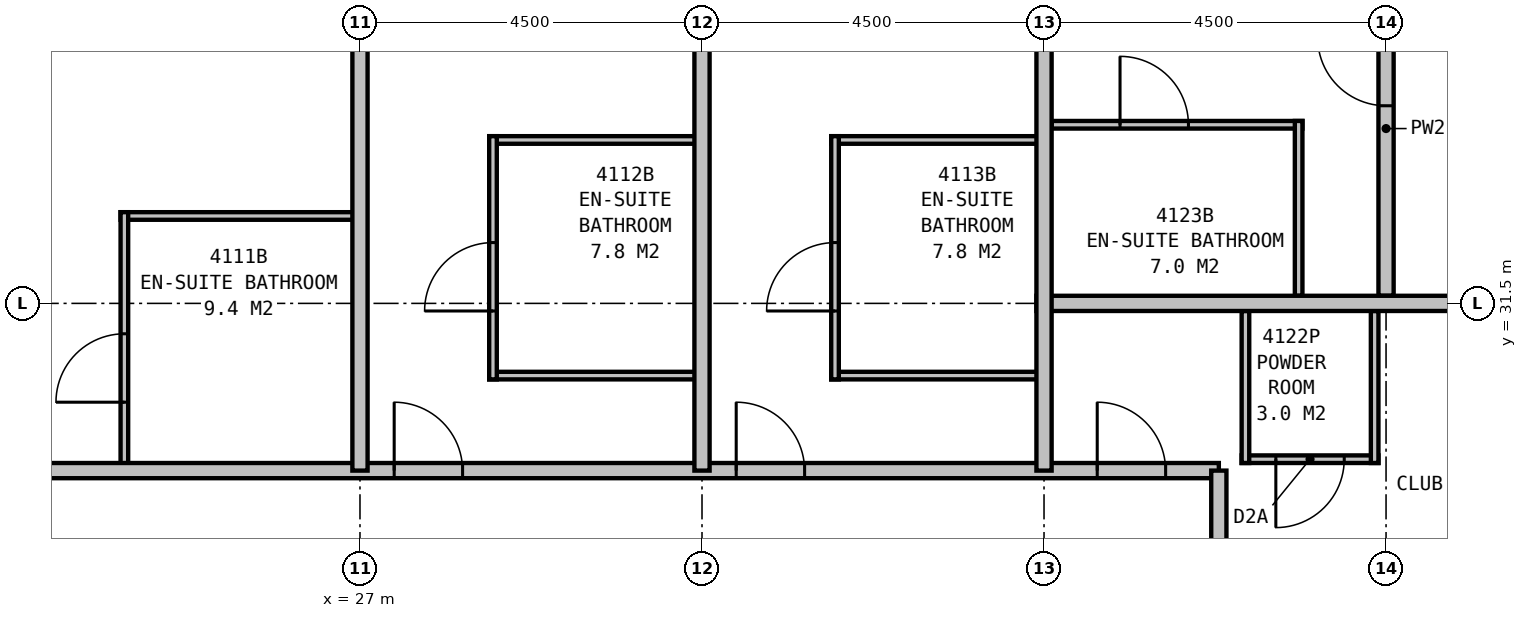
"""IFC4 building model, lengths in metres.
Left out: names, types, materials, properties, quantities, classifications, styles, units other than length and angle.
Written with IfcOpenShell. Run it as: python <this file> out.ifc"""

import sys

from ifc_helpers import new_model, si_unit, direction, frame, frame_2d, origin, place, context, subcontext, project, spatial, rectangle, extrude, element, fill, save


model = new_model("IFC4")
c1 = context("Model", 3, precision=1e-05, world=origin(), true_north=direction((0.0, 1.0)))
c2 = subcontext(c1, "Body", "Model", "MODEL_VIEW")
j1 = project(units=[si_unit("LENGTHUNIT", "METRE"), si_unit("PLANEANGLEUNIT", "RADIAN")], contexts=[c1])
p1 = place(None, origin())
s1 = spatial("IfcSite", under=j1, at=p1, CompositionType="ELEMENT")
p2 = place(p1, origin())
s2 = spatial("IfcBuilding", under=s1, at=p2, CompositionType="ELEMENT")
p3 = place(p2, frame((0.0, 0.0, 162.4)))
s3 = spatial("IfcBuildingStorey", under=s2, at=p3, CompositionType="ELEMENT", Elevation=162.4)
p4 = place(p3, frame((11.2, 29.3, 0.0), z_axis=(0.0, 0.0, 1.0), x_axis=(1.0, 0.0, 0.0)))
e1 = element("IfcWall", 1, at=p4, inside=s3, PredefinedType="PARTITIONING", context=c2, shape_type="SweptSolid", body=[
    extrude(rectangle(XDim=27.1, YDim=0.2, at=frame_2d((13.55, 0.0))), origin(), (0.0, 0.0, 1.0), 3.25),
])
p5 = place(p4, frame((2.75, 0.0, 0.0)))
e2 = element("IfcOpeningElement", 2, at=p5, cuts=e1, PredefinedType="OPENING", context=c2, shape_type="SweptSolid", body=[
    extrude(rectangle(XDim=0.9, YDim=2.1, at=frame_2d((0.45, 1.05))), frame((0.0, 0.11, 0.0), z_axis=(0.0, -1.0, 0.0), x_axis=(1.0, 0.0, 0.0)), (0.0, 0.0, 1.0), 0.22),
])
p6 = place(p4, frame((9.55, 0.0, 0.0)))
e3 = element("IfcOpeningElement", 3, at=p6, cuts=e1, PredefinedType="OPENING", context=c2, shape_type="SweptSolid", body=[
    extrude(rectangle(XDim=0.9, YDim=2.1, at=frame_2d((0.45, 1.05))), frame((0.0, 0.11, 0.0), z_axis=(0.0, -1.0, 0.0), x_axis=(1.0, 0.0, 0.0)), (0.0, 0.0, 1.0), 0.22),
])
p7 = place(p4, frame((16.25, 0.0, 0.0)))
e4 = element("IfcOpeningElement", 4, at=p7, cuts=e1, PredefinedType="OPENING", context=c2, shape_type="SweptSolid", body=[
    extrude(rectangle(XDim=0.9, YDim=2.1, at=frame_2d((0.45, 1.05))), frame((0.0, 0.11, 0.0), z_axis=(0.0, -1.0, 0.0), x_axis=(1.0, 0.0, 0.0)), (0.0, 0.0, 1.0), 0.22),
])
p8 = place(p4, frame((20.75, 0.0, 0.0)))
e5 = element("IfcOpeningElement", 5, at=p8, cuts=e1, PredefinedType="OPENING", context=c2, shape_type="SweptSolid", body=[
    extrude(rectangle(XDim=0.9, YDim=2.1, at=frame_2d((0.45, 1.05))), frame((0.0, 0.11, 0.0), z_axis=(0.0, -1.0, 0.0), x_axis=(1.0, 0.0, 0.0)), (0.0, 0.0, 1.0), 0.22),
])
p9 = place(p4, frame((25.5, 0.0, 0.0)))
e6 = element("IfcOpeningElement", 6, at=p9, cuts=e1, PredefinedType="OPENING", context=c2, shape_type="SweptSolid", body=[
    extrude(rectangle(XDim=0.9, YDim=2.1, at=frame_2d((0.45, 1.05))), frame((0.0, 0.11, 0.0), z_axis=(0.0, -1.0, 0.0), x_axis=(1.0, 0.0, 0.0)), (0.0, 0.0, 1.0), 0.22),
])
p10 = place(p4, frame((0.7, 0.0, 0.0)))
e7 = element("IfcOpeningElement", 7, at=p10, cuts=e1, PredefinedType="OPENING", context=c2, shape_type="SweptSolid", body=[
    extrude(rectangle(XDim=0.9, YDim=2.1, at=frame_2d((0.45, 1.05))), frame((0.0, 0.11, 0.0), z_axis=(0.0, -1.0, 0.0), x_axis=(1.0, 0.0, 0.0)), (0.0, 0.0, 1.0), 0.22),
])
p11 = place(p3, frame((38.3, 10.6, 0.0), z_axis=(0.0, 0.0, 1.0), x_axis=(0.0, 1.0, 0.0)))
e8 = element("IfcWall", 8, at=p11, inside=s3, PredefinedType="PARTITIONING", context=c2, shape_type="SweptSolid", body=[
    extrude(rectangle(XDim=18.7, YDim=0.2, at=frame_2d((9.35, 0.0))), origin(), (0.0, 0.0, 1.0), 3.25),
])
p12 = place(p11, frame((6.95, 0.0, 0.0), z_axis=(0.0, 0.0, 1.0), x_axis=(-1.0, 0.0, 0.0)))
e9 = element("IfcOpeningElement", 9, at=p12, cuts=e8, PredefinedType="OPENING", context=c2, shape_type="SweptSolid", body=[
    extrude(rectangle(XDim=0.9, YDim=2.1, at=frame_2d((0.45, 1.05))), frame((0.0, 0.11, 0.0), z_axis=(0.0, -1.0, 0.0), x_axis=(1.0, 0.0, 0.0)), (0.0, 0.0, 1.0), 0.22),
])
p13 = place(p11, frame((11.05, 0.0, 0.0), z_axis=(0.0, 0.0, 1.0), x_axis=(-1.0, 0.0, 0.0)))
e10 = element("IfcOpeningElement", 10, at=p13, cuts=e8, PredefinedType="OPENING", context=c2, shape_type="SweptSolid", body=[
    extrude(rectangle(XDim=0.9, YDim=2.1, at=frame_2d((0.45, 1.05))), frame((0.0, 0.11, 0.0), z_axis=(0.0, -1.0, 0.0), x_axis=(1.0, 0.0, 0.0)), (0.0, 0.0, 1.0), 0.22),
])
for number, where, z_axis, x_axis in (
    (11, (27.0, 29.3, 0.0), (0.0, 0.0, 1.0), (0.0, 1.0, 0.0)),
    (12, (31.5, 29.3, 0.0), (0.0, 0.0, 1.0), (0.0, 1.0, 0.0)),
):
    element("IfcWall", number, at=place(p3, frame(where, z_axis=z_axis, x_axis=x_axis)), inside=s3, PredefinedType="PARTITIONING", context=c2, shape_type="SweptSolid", body=[
        extrude(rectangle(XDim=11.2, YDim=0.2, at=frame_2d((5.6, 0.0))), origin(), (0.0, 0.0, 1.0), 2.25),
    ])
p14 = place(p3, frame((23.85, 32.65, 0.0), z_axis=(0.0, 0.0, 1.0), x_axis=(1.0, 0.0, 0.0)))
e13 = element("IfcWall", 13, at=p14, inside=s3, PredefinedType="PLUMBINGWALL", context=c2, shape_type="SweptSolid", body=[
    extrude(rectangle(XDim=3.15, YDim=0.1, at=frame_2d((1.575, 0.0))), origin(), (0.0, 0.0, 1.0), 3.25),
])
p15 = place(p3, frame((23.9, 29.3, 0.0), z_axis=(0.0, 0.0, 1.0), x_axis=(0.0, 1.0, 0.0)))
e14 = element("IfcWall", 14, at=p15, inside=s3, PredefinedType="PLUMBINGWALL", context=c2, shape_type="SweptSolid", body=[
    extrude(rectangle(XDim=3.4, YDim=0.1, at=frame_2d((1.7, 0.0))), origin(), (0.0, 0.0, 1.0), 3.25),
])
p16 = place(p15, frame((0.9, 0.0, 0.0)))
e15 = element("IfcOpeningElement", 15, at=p16, cuts=e14, PredefinedType="OPENING", context=c2, shape_type="SweptSolid", body=[
    extrude(rectangle(XDim=0.9, YDim=2.1, at=frame_2d((0.45, 1.05))), frame((0.0, 0.06, 0.0), z_axis=(0.0, -1.0, 0.0), x_axis=(1.0, 0.0, 0.0)), (0.0, 0.0, 1.0), 0.12),
])
for number, where, z_axis, x_axis in (
    (16, (28.7, 30.55, 0.0), (0.0, 0.0, 1.0), (1.0, 0.0, 0.0)),
    (17, (28.7, 33.65, 0.0), (0.0, 0.0, 1.0), (1.0, 0.0, 0.0)),
):
    element("IfcWall", number, at=place(p3, frame(where, z_axis=z_axis, x_axis=x_axis)), inside=s3, PredefinedType="PLUMBINGWALL", context=c2, shape_type="SweptSolid", body=[
        extrude(rectangle(XDim=2.8, YDim=0.1, at=frame_2d((1.4, 0.0))), origin(), (0.0, 0.0, 1.0), 3.25),
    ])
p17 = place(p3, frame((28.75, 30.5, 0.0), z_axis=(0.0, 0.0, 1.0), x_axis=(0.0, 1.0, 0.0)))
e18 = element("IfcWall", 18, at=p17, inside=s3, PredefinedType="PLUMBINGWALL", context=c2, shape_type="SweptSolid", body=[
    extrude(rectangle(XDim=3.2, YDim=0.1, at=frame_2d((1.6, 0.0))), origin(), (0.0, 0.0, 1.0), 3.25),
])
p18 = place(p17, frame((0.9, 0.0, 0.0)))
e19 = element("IfcOpeningElement", 19, at=p18, cuts=e18, PredefinedType="OPENING", context=c2, shape_type="SweptSolid", body=[
    extrude(rectangle(XDim=0.9, YDim=2.1, at=frame_2d((0.45, 1.05))), frame((0.0, 0.06, 0.0), z_axis=(0.0, -1.0, 0.0), x_axis=(1.0, 0.0, 0.0)), (0.0, 0.0, 1.0), 0.12),
])
for number, where, z_axis, x_axis in (
    (20, (33.2, 30.55, 0.0), (0.0, 0.0, 1.0), (1.0, 0.0, 0.0)),
    (21, (33.2, 33.65, 0.0), (0.0, 0.0, 1.0), (1.0, 0.0, 0.0)),
):
    element("IfcWall", number, at=place(p3, frame(where, z_axis=z_axis, x_axis=x_axis)), inside=s3, PredefinedType="PLUMBINGWALL", context=c2, shape_type="SweptSolid", body=[
        extrude(rectangle(XDim=2.8, YDim=0.1, at=frame_2d((1.4, 0.0))), origin(), (0.0, 0.0, 1.0), 3.25),
    ])
p19 = place(p3, frame((33.25, 30.5, 0.0), z_axis=(0.0, 0.0, 1.0), x_axis=(0.0, 1.0, 0.0)))
e22 = element("IfcWall", 22, at=p19, inside=s3, PredefinedType="PLUMBINGWALL", context=c2, shape_type="SweptSolid", body=[
    extrude(rectangle(XDim=3.2, YDim=0.1, at=frame_2d((1.6, 0.0))), origin(), (0.0, 0.0, 1.0), 3.25),
])
p20 = place(p19, frame((0.9, 0.0, 0.0)))
e23 = element("IfcOpeningElement", 23, at=p20, cuts=e22, PredefinedType="OPENING", context=c2, shape_type="SweptSolid", body=[
    extrude(rectangle(XDim=0.9, YDim=2.1, at=frame_2d((0.45, 1.05))), frame((0.0, 0.06, 0.0), z_axis=(0.0, -1.0, 0.0), x_axis=(1.0, 0.0, 0.0)), (0.0, 0.0, 1.0), 0.12),
])
p21 = place(p3, frame((36.0, 29.3, 0.0), z_axis=(0.0, 0.0, 1.0), x_axis=(0.0, 1.0, 0.0)))
e24 = element("IfcWall", 24, at=p21, inside=s3, PredefinedType="PARTITIONING", context=c2, shape_type="SweptSolid", body=[
    extrude(rectangle(XDim=11.2, YDim=0.2, at=frame_2d((5.6, 0.0))), origin(), (0.0, 0.0, 1.0), 2.25),
])
p22 = place(p3, frame((35.9, 31.5, 0.0), z_axis=(0.0, 0.0, 1.0), x_axis=(1.0, 0.0, 0.0)))
e25 = element("IfcWall", 25, at=p22, inside=s3, PredefinedType="PARTITIONING", context=c2, shape_type="SweptSolid", body=[
    extrude(rectangle(XDim=10.099, YDim=0.2, at=frame_2d((5.05, 0.0))), origin(), (0.0, 0.0, 1.0), 3.25),
])
p23 = place(p22, frame((8.099, 0.0, 0.0)))
e26 = element("IfcOpeningElement", 26, at=p23, cuts=e25, PredefinedType="OPENING", context=c2, shape_type="SweptSolid", body=[
    extrude(rectangle(XDim=0.9, YDim=2.1, at=frame_2d((0.45, 1.05))), frame((0.0, 0.11, 0.0), z_axis=(0.0, -1.0, 0.0), x_axis=(1.0, 0.0, 0.0)), (0.0, 0.0, 1.0), 0.22),
])
p24 = place(p3, frame((40.35, 31.4, 0.0), z_axis=(0.0, 0.0, 1.0), x_axis=(0.0, -1.0, 0.0)))
e27 = element("IfcWall", 27, at=p24, inside=s3, PredefinedType="PLUMBINGWALL", context=c2, shape_type="SweptSolid", body=[
    extrude(rectangle(XDim=2.0, YDim=0.1, at=frame_2d((1.0, 0.0))), origin(), (0.0, 0.0, 1.0), 2.25),
])
p25 = place(p3, frame((38.65, 31.4, 0.0), z_axis=(0.0, 0.0, 1.0), x_axis=(0.0, -1.0, 0.0)))
e28 = element("IfcWall", 28, at=p25, inside=s3, PredefinedType="PLUMBINGWALL", context=c2, shape_type="SweptSolid", body=[
    extrude(rectangle(XDim=2.0, YDim=0.1, at=frame_2d((1.0, 0.0))), origin(), (0.0, 0.0, 1.0), 3.25),
])
p26 = place(p3, frame((38.6, 29.45, 0.0), z_axis=(0.0, 0.0, 1.0), x_axis=(1.0, 0.0, 0.0)))
e29 = element("IfcWall", 29, at=p26, inside=s3, PredefinedType="PLUMBINGWALL", context=c2, shape_type="SweptSolid", body=[
    extrude(rectangle(XDim=1.8, YDim=0.1, at=frame_2d((0.9, 0.0))), origin(), (0.0, 0.0, 1.0), 3.25),
])
p27 = place(p26, frame((1.35, 0.0, 0.0), z_axis=(0.0, 0.0, 1.0), x_axis=(-1.0, 0.0, 0.0)))
e30 = element("IfcOpeningElement", 30, at=p27, cuts=e29, PredefinedType="OPENING", context=c2, shape_type="SweptSolid", body=[
    extrude(rectangle(XDim=0.9, YDim=2.1, at=frame_2d((0.45, 1.05))), frame((0.0, 0.06, 0.0), z_axis=(0.0, -1.0, 0.0), x_axis=(1.0, 0.0, 0.0)), (0.0, 0.0, 1.0), 0.12),
])
p28 = place(p3, frame((40.5, 31.6, 0.0), z_axis=(0.0, 0.0, 1.0), x_axis=(0.0, 1.0, 0.0)))
e31 = element("IfcWall", 31, at=p28, inside=s3, PredefinedType="PARTITIONING", context=c2, shape_type="SweptSolid", body=[
    extrude(rectangle(XDim=4.4, YDim=0.2, at=frame_2d((2.2, 0.0))), origin(), (0.0, 0.0, 1.0), 2.25),
])
p29 = place(p28, frame((2.5, 0.0, 0.0)))
e32 = element("IfcOpeningElement", 32, at=p29, cuts=e31, PredefinedType="OPENING", context=c2, shape_type="SweptSolid", body=[
    extrude(rectangle(XDim=0.9, YDim=2.1, at=frame_2d((0.45, 1.05))), frame((0.0, 0.11, 0.0), z_axis=(0.0, -1.0, 0.0), x_axis=(1.0, 0.0, 0.0)), (0.0, 0.0, 1.0), 0.22),
])
p30 = place(p3, frame((39.35, 31.6, 0.0), z_axis=(0.0, 0.0, 1.0), x_axis=(0.0, 1.0, 0.0)))
e33 = element("IfcWall", 33, at=p30, inside=s3, PredefinedType="PLUMBINGWALL", context=c2, shape_type="SweptSolid", body=[
    extrude(rectangle(XDim=2.3, YDim=0.1, at=frame_2d((1.15, 0.0))), origin(), (0.0, 0.0, 1.0), 3.25),
])
p31 = place(p3, frame((36.1, 33.85, 0.0), z_axis=(0.0, 0.0, 1.0), x_axis=(1.0, 0.0, 0.0)))
e34 = element("IfcWall", 34, at=p31, inside=s3, PredefinedType="PLUMBINGWALL", context=c2, shape_type="SweptSolid", body=[
    extrude(rectangle(XDim=3.3, YDim=0.1, at=frame_2d((1.65, 0.0))), origin(), (0.0, 0.0, 1.0), 3.25),
])
p32 = place(p31, frame((0.9, 0.0, 0.0)))
e35 = element("IfcOpeningElement", 35, at=p32, cuts=e34, PredefinedType="OPENING", context=c2, shape_type="SweptSolid", body=[
    extrude(rectangle(XDim=0.9, YDim=2.1, at=frame_2d((0.45, 1.05))), frame((0.0, 0.06, 0.0), z_axis=(0.0, -1.0, 0.0), x_axis=(1.0, 0.0, 0.0)), (0.0, 0.0, 1.0), 0.12),
])
p33 = place(p7, origin())
e36 = element("IfcDoor", 36, at=p33, inside=s3, OperationType="SINGLE_SWING_LEFT", PredefinedType="DOOR", context=c2, shape_type="SweptSolid", body=[
    extrude(rectangle(XDim=0.9, YDim=2.1, at=frame_2d((0.45, 1.05))), frame((0.0, 0.025, 0.0), z_axis=(0.0, -1.0, 0.0), x_axis=(1.0, 0.0, 0.0)), (0.0, 0.0, 1.0), 0.05),
])
fill(e4, e36)
p34 = place(p8, origin())
e37 = element("IfcDoor", 37, at=p34, inside=s3, OperationType="SINGLE_SWING_LEFT", PredefinedType="DOOR", context=c2, shape_type="SweptSolid", body=[
    extrude(rectangle(XDim=0.9, YDim=2.1, at=frame_2d((0.45, 1.05))), frame((0.0, 0.025, 0.0), z_axis=(0.0, -1.0, 0.0), x_axis=(1.0, 0.0, 0.0)), (0.0, 0.0, 1.0), 0.05),
])
fill(e5, e37)
p35 = place(p9, origin())
e38 = element("IfcDoor", 38, at=p35, inside=s3, OperationType="SINGLE_SWING_LEFT", PredefinedType="DOOR", context=c2, shape_type="SweptSolid", body=[
    extrude(rectangle(XDim=0.9, YDim=2.1, at=frame_2d((0.45, 1.05))), frame((0.0, 0.025, 0.0), z_axis=(0.0, -1.0, 0.0), x_axis=(1.0, 0.0, 0.0)), (0.0, 0.0, 1.0), 0.05),
])
fill(e6, e38)
p36 = place(p16, origin())
e39 = element("IfcDoor", 39, at=p36, inside=s3, OperationType="SINGLE_SWING_LEFT", PredefinedType="DOOR", context=c2, shape_type="SweptSolid", body=[
    extrude(rectangle(XDim=0.9, YDim=2.1, at=frame_2d((0.45, 1.05))), frame((0.0, 0.025, 0.0), z_axis=(0.0, -1.0, 0.0), x_axis=(1.0, 0.0, 0.0)), (0.0, 0.0, 1.0), 0.05),
])
fill(e15, e39)
p37 = place(p18, origin())
e40 = element("IfcDoor", 40, at=p37, inside=s3, OperationType="SINGLE_SWING_LEFT", PredefinedType="DOOR", context=c2, shape_type="SweptSolid", body=[
    extrude(rectangle(XDim=0.9, YDim=2.1, at=frame_2d((0.45, 1.05))), frame((0.0, 0.025, 0.0), z_axis=(0.0, -1.0, 0.0), x_axis=(1.0, 0.0, 0.0)), (0.0, 0.0, 1.0), 0.05),
])
fill(e19, e40)
p38 = place(p20, origin())
e41 = element("IfcDoor", 41, at=p38, inside=s3, OperationType="SINGLE_SWING_LEFT", PredefinedType="DOOR", context=c2, shape_type="SweptSolid", body=[
    extrude(rectangle(XDim=0.9, YDim=2.1, at=frame_2d((0.45, 1.05))), frame((0.0, 0.025, 0.0), z_axis=(0.0, -1.0, 0.0), x_axis=(1.0, 0.0, 0.0)), (0.0, 0.0, 1.0), 0.05),
])
fill(e23, e41)
p39 = place(p27, origin())
e42 = element("IfcDoor", 42, at=p39, inside=s3, OperationType="SINGLE_SWING_RIGHT", PredefinedType="DOOR", context=c2, shape_type="SweptSolid", body=[
    extrude(rectangle(XDim=0.9, YDim=2.1, at=frame_2d((0.45, 1.05))), frame((0.0, 0.025, 0.0), z_axis=(0.0, -1.0, 0.0), x_axis=(1.0, 0.0, 0.0)), (0.0, 0.0, 1.0), 0.05),
])
fill(e30, e42)
p40 = place(p29, origin())
e43 = element("IfcDoor", 43, at=p40, inside=s3, OperationType="SINGLE_SWING_RIGHT", PredefinedType="DOOR", context=c2, shape_type="SweptSolid", body=[
    extrude(rectangle(XDim=0.9, YDim=2.1, at=frame_2d((0.45, 1.05))), frame((0.0, 0.025, 0.0), z_axis=(0.0, -1.0, 0.0), x_axis=(1.0, 0.0, 0.0)), (0.0, 0.0, 1.0), 0.05),
])
fill(e32, e43)
p41 = place(p32, origin())
e44 = element("IfcDoor", 44, at=p41, inside=s3, OperationType="SINGLE_SWING_LEFT", PredefinedType="DOOR", context=c2, shape_type="SweptSolid", body=[
    extrude(rectangle(XDim=0.9, YDim=2.1, at=frame_2d((0.45, 1.05))), frame((0.0, 0.025, 0.0), z_axis=(0.0, -1.0, 0.0), x_axis=(1.0, 0.0, 0.0)), (0.0, 0.0, 1.0), 0.05),
])
fill(e35, e44)
save(model, sys.argv[1])
